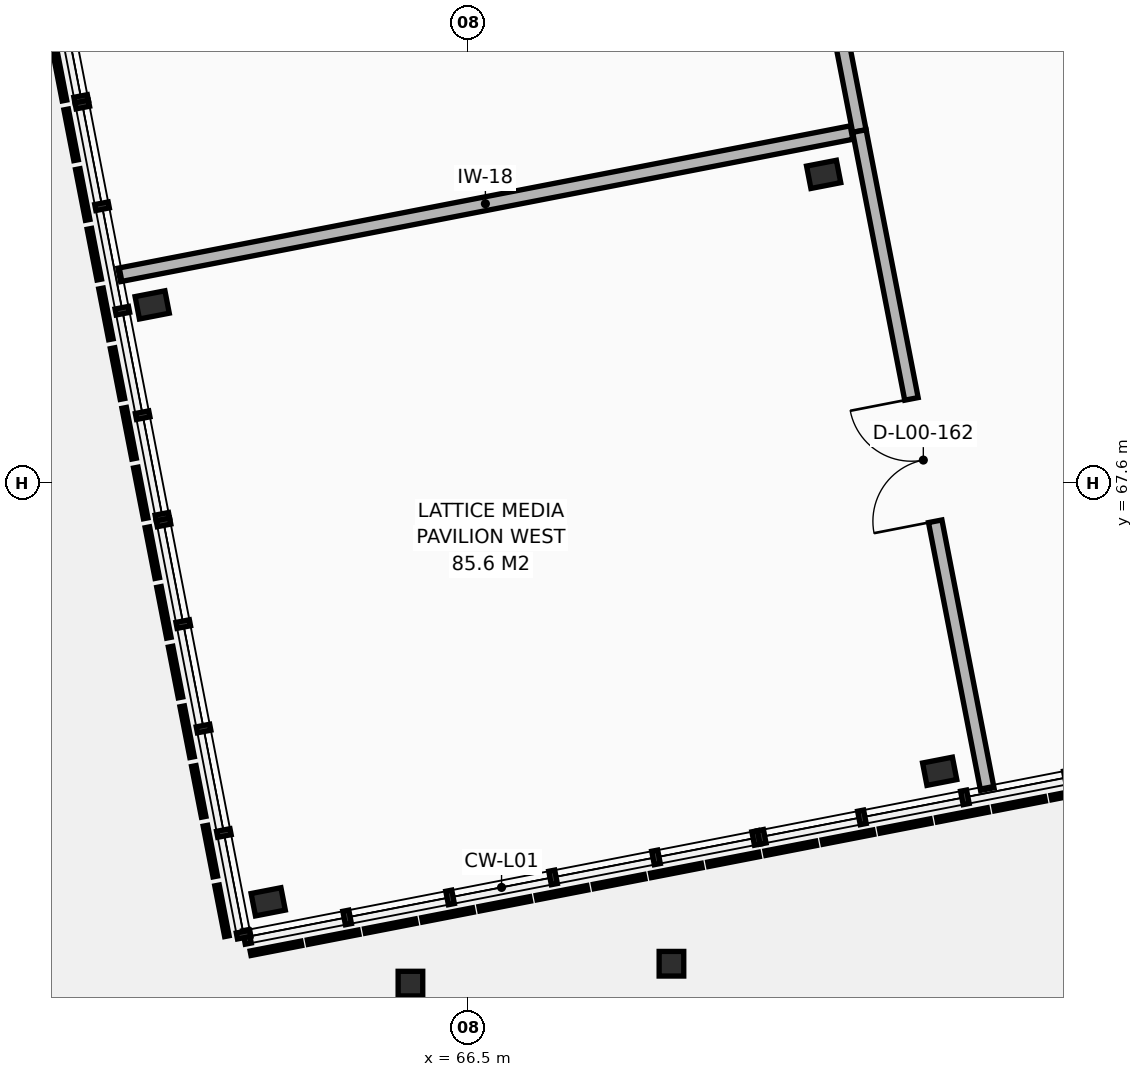
"""IFC4 building model, lengths in metres.
Left out: names, types, materials, properties, quantities, classifications, styles, units other than length and angle.
Written with IfcOpenShell. Run it as: python <this file> out.ifc"""

import sys

from ifc_helpers import new_model, si_unit, direction, frame, frame_2d, origin, origin_2d, place, context, subcontext, project, spatial, rectangle, hollow_circle, i_section, extrude, element, fill, save


model = new_model("IFC4")
c1 = context("Model", 3, precision=1e-05, world=origin(), true_north=direction((0.0, 1.0)))
c2 = subcontext(c1, "Body", "Model", "MODEL_VIEW")
j1 = project(units=[si_unit("LENGTHUNIT", "METRE"), si_unit("PLANEANGLEUNIT", "RADIAN")], contexts=[c1])
p1 = place(None, origin())
s1 = spatial("IfcSite", under=j1, at=p1, CompositionType="ELEMENT")
p2 = place(p1, origin())
s2 = spatial("IfcBuilding", under=s1, at=p2, CompositionType="ELEMENT")
p3 = place(p2, origin())
s3 = spatial("IfcBuildingStorey", under=s2, at=p3, CompositionType="ELEMENT", Elevation=0.0)
for number, where, z_axis, x_axis in (
    (1, (63.873, 62.09, 0.0), (0.0, 0.0, 1.0), (0.982, 0.191, 0.0)),
    (2, (62.346, 69.943, 0.0), (0.0, 0.0, 1.0), (0.982, 0.191, 0.0)),
    (3, (72.707, 63.807, 0.0), (0.0, 0.0, 1.0), (0.982, 0.191, 0.0)),
    (4, (71.181, 71.66, 0.0), (0.0, 0.0, 1.0), (0.982, 0.191, 0.0)),
):
    element("IfcColumn", number, at=place(p3, frame(where, z_axis=z_axis, x_axis=x_axis)), inside=s3, PredefinedType="COLUMN", context=c2, shape_type="SweptSolid", body=[
        extrude(i_section(OverallWidth=0.3, OverallDepth=0.4, WebThickness=0.013, FlangeThickness=0.024, FilletRadius=0.027, at=origin_2d()), origin(), (0.0, 0.0, 1.0), 5.1),
    ])
for number, where, z_axis, x_axis in (
    (5, (69.178, 61.275, 0.0), (0.0, 0.0, 1.0), (1.0, 0.0, 0.0)),
    (6, (65.744, 61.014, 0.0), (0.0, 0.0, 1.0), (1.0, 0.0, 0.0)),
):
    element("IfcColumn", number, at=place(p3, frame(where, z_axis=z_axis, x_axis=x_axis)), inside=s3, PredefinedType="COLUMN", context=c2, shape_type="SweptSolid", body=[
        extrude(hollow_circle(Radius=0.162, WallThickness=0.016, at=origin_2d()), origin(), (0.0, 0.0, 1.0), 5.1),
    ])
p4 = place(p3, frame((71.651, 72.23, 0.0), z_axis=(0.0, 0.0, 1.0), x_axis=(-0.190786732806, 0.981631510591, 0.0)))
e7 = element("IfcWall", 7, at=p4, inside=s3, PredefinedType="PARTITIONING", context=c2, shape_type="SweptSolid", body=[
    extrude(rectangle(XDim=7.88, YDim=0.18, at=frame_2d((3.94, 0.0))), origin(), (0.0, 0.0, 1.0), 4.47),
])
p5 = place(p4, frame((3.23, 0.0, 0.0)))
e8 = element("IfcOpeningElement", 8, at=p5, cuts=e7, PredefinedType="OPENING", context=c2, shape_type="SweptSolid", body=[
    extrude(rectangle(XDim=1.42, YDim=2.18, at=frame_2d((0.71, 1.09))), frame((0.0, 0.1, 0.0), z_axis=(0.0, -1.0, 0.0), x_axis=(1.0, 0.0, 0.0)), (0.0, 0.0, 1.0), 0.2),
])
p6 = place(p3, frame((73.333, 63.573, 0.0), z_axis=(0.0, 0.0, 1.0), x_axis=(-0.190805940679, 0.981627777216, 0.0)))
e9 = element("IfcWall", 9, at=p6, inside=s3, PredefinedType="PARTITIONING", context=c2, shape_type="SweptSolid", body=[
    extrude(rectangle(XDim=8.82, YDim=0.18, at=frame_2d((4.41, 0.0))), origin(), (0.0, 0.0, 1.0), 4.42),
])
p7 = place(p6, frame((3.59, 0.0, 0.0)))
e10 = element("IfcOpeningElement", 10, at=p7, cuts=e9, PredefinedType="OPENING", context=c2, shape_type="SweptSolid", body=[
    extrude(rectangle(XDim=1.64, YDim=2.2, at=frame_2d((0.82, 1.1))), frame((0.0, 0.1, 0.0), z_axis=(0.0, -1.0, 0.0), x_axis=(1.0, 0.0, 0.0)), (0.0, 0.0, 1.0), 0.2),
])
p8 = place(p3, frame((71.548, 72.21, 0.0), z_axis=(0.0, 0.0, 1.0), x_axis=(-0.981627297685, -0.190808407676, 0.0)))
e11 = element("IfcWall", 11, at=p8, inside=s3, PredefinedType="PARTITIONING", context=c2, shape_type="SweptSolid", body=[
    extrude(rectangle(XDim=9.815, YDim=0.18, at=frame_2d((4.908, 0.0))), origin(), (0.0, 0.0, 1.0), 4.47),
])
p9 = place(p7, origin())
e12 = element("IfcDoor", 12, at=p9, inside=s3, OperationType="DOUBLE_DOOR_SINGLE_SWING", PredefinedType="DOOR", context=c2, shape_type="SweptSolid", body=[
    extrude(rectangle(XDim=1.64, YDim=2.2, at=frame_2d((0.82, 1.1))), frame((0.0, 0.025, 0.0), z_axis=(0.0, -1.0, 0.0), x_axis=(1.0, 0.0, 0.0)), (0.0, 0.0, 1.0), 0.05),
])
fill(e10, e12)
save(model, sys.argv[1])
